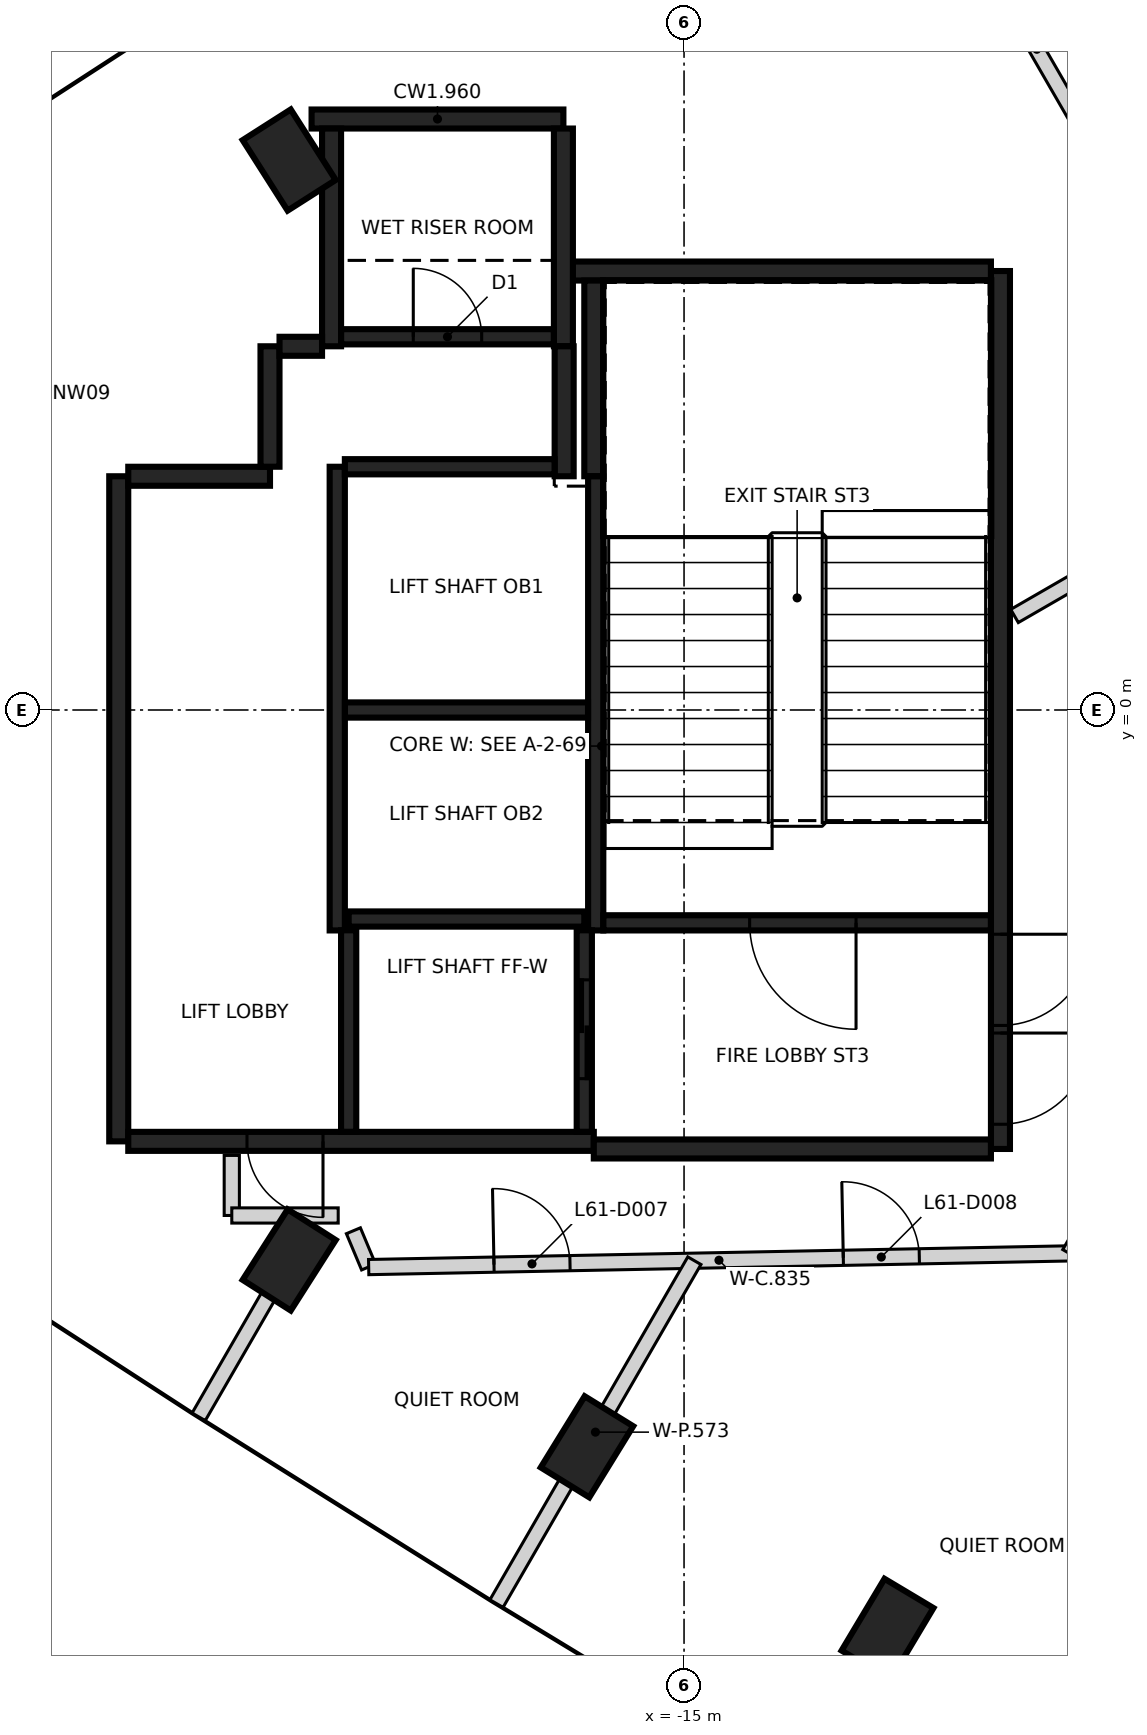
"""IFC4 building model, lengths in metres.
Left out: names, types, materials, properties, quantities, classifications, styles, units other than length and angle.
Written with IfcOpenShell. Run it as: python <this file> out.ifc"""

import sys

from ifc_helpers import new_model, si_unit, direction, frame, frame_2d, origin, origin_2d, place, context, subcontext, project, spatial, rectangle, extrude, element, fill, save


model = new_model("IFC4")
c1 = context("Model", 3, precision=1e-05, world=origin(), true_north=direction((0.0, 1.0)))
c2 = subcontext(c1, "Body", "Model", "MODEL_VIEW")
j1 = project(units=[si_unit("LENGTHUNIT", "METRE"), si_unit("PLANEANGLEUNIT", "RADIAN")], contexts=[c1])
p1 = place(None, origin())
s1 = spatial("IfcSite", under=j1, at=p1, CompositionType="ELEMENT")
p2 = place(p1, origin())
s2 = spatial("IfcBuilding", under=s1, at=p2, CompositionType="ELEMENT")
p3 = place(p2, frame((0.0, 0.0, 243.0)))
s3 = spatial("IfcBuildingStorey", under=s2, at=p3, CompositionType="ELEMENT", Elevation=243.0)
for number, where, z_axis, x_axis in (
    (1, (-20.195, 7.235, -0.35), (0.0, 0.0, 1.0), (-0.538, 0.843, 0.0)),
    (2, (-20.195, -7.235, -0.35), (0.0, 0.0, 1.0), (0.538, 0.843, 0.0)),
    (3, (-16.277, -9.693, -0.35), (0.0, 0.0, 1.0), (0.525, 0.851, 0.0)),
    (4, (-12.323, -12.094, -0.35), (0.0, 0.0, 1.0), (0.513, 0.858, 0.0)),
):
    element("IfcColumn", number, at=place(p3, frame(where, z_axis=z_axis, x_axis=x_axis)), inside=s3, PredefinedType="COLUMN", context=c2, shape_type="SweptSolid", body=[
        extrude(rectangle(XDim=1.1, YDim=0.75, at=origin_2d()), origin(), (0.0, 0.0, 1.0), 3.6),
    ])
p4 = place(p3, frame((-10.837, 5.775, 0.0), z_axis=(0.0, 0.0, 1.0), x_axis=(0.0, -1.0, 0.0)))
e5 = element("IfcWall", 5, at=p4, inside=s3, PredefinedType="SHEAR", context=c2, shape_type="SweptSolid", body=[
    extrude(rectangle(XDim=11.55, YDim=0.25, at=frame_2d((5.775, 0.0))), origin(), (0.0, 0.0, 1.0), 3.25),
])
p5 = place(p4, frame((10.025, 0.0, 0.0)))
e6 = element("IfcOpeningElement", 6, at=p5, cuts=e5, PredefinedType="OPENING", context=c2, shape_type="SweptSolid", body=[
    extrude(rectangle(XDim=1.2, YDim=2.1, at=frame_2d((0.6, 1.05))), frame((0.0, 0.135, 0.0), z_axis=(0.0, -1.0, 0.0), x_axis=(1.0, 0.0, 0.0)), (0.0, 0.0, 1.0), 0.27),
])
p6 = place(p4, frame((8.725, 0.0, 0.0)))
e7 = element("IfcOpeningElement", 7, at=p6, cuts=e5, PredefinedType="OPENING", context=c2, shape_type="SweptSolid", body=[
    extrude(rectangle(XDim=1.2, YDim=2.1, at=frame_2d((0.6, 1.05))), frame((0.0, 0.135, 0.0), z_axis=(0.0, -1.0, 0.0), x_axis=(1.0, 0.0, 0.0)), (0.0, 0.0, 1.0), 0.27),
])
p7 = place(p3, frame((-22.437, -5.675, 0.0), z_axis=(0.0, 0.0, 1.0), x_axis=(0.0, 1.0, 0.0)))
e8 = element("IfcWall", 8, at=p7, inside=s3, PredefinedType="SHEAR", context=c2, shape_type="SweptSolid", body=[
    extrude(rectangle(XDim=8.75, YDim=0.25, at=frame_2d((4.375, 0.0))), origin(), (0.0, 0.0, 1.0), 3.25),
])
p8 = place(p3, frame((-16.187, -5.675, 0.0), z_axis=(0.0, 0.0, 1.0), x_axis=(-1.0, 0.0, 0.0)))
e9 = element("IfcWall", 9, at=p8, inside=s3, PredefinedType="SHEAR", context=c2, shape_type="SweptSolid", body=[
    extrude(rectangle(XDim=6.125, YDim=0.25, at=frame_2d((3.062, 0.0))), origin(), (0.0, 0.0, 1.0), 3.25),
])
p9 = place(p8, frame((3.563, 0.0, 0.0)))
e10 = element("IfcOpeningElement", 10, at=p9, cuts=e9, PredefinedType="OPENING", context=c2, shape_type="SweptSolid", body=[
    extrude(rectangle(XDim=1.0, YDim=2.1, at=frame_2d((0.5, 1.05))), frame((0.0, 0.135, 0.0), z_axis=(0.0, -1.0, 0.0), x_axis=(1.0, 0.0, 0.0)), (0.0, 0.0, 1.0), 0.27),
])
p10 = place(p3, frame((-10.963, -5.775, 0.0), z_axis=(0.0, 0.0, 1.0), x_axis=(-1.0, 0.0, 0.0)))
e11 = element("IfcWall", 11, at=p10, inside=s3, PredefinedType="SHEAR", context=c2, shape_type="SweptSolid", body=[
    extrude(rectangle(XDim=5.225, YDim=0.25, at=frame_2d((2.612, 0.0))), origin(), (0.0, 0.0, 1.0), 3.25),
])
p11 = place(p3, frame((-16.472, 5.775, 0.0), z_axis=(0.0, 0.0, 1.0), x_axis=(1.0, 0.0, 0.0)))
e12 = element("IfcWall", 12, at=p11, inside=s3, PredefinedType="SHEAR", context=c2, shape_type="SweptSolid", body=[
    extrude(rectangle(XDim=5.51, YDim=0.25, at=frame_2d((2.755, 0.0))), origin(), (0.0, 0.0, 1.0), 3.25),
])
p12 = place(p3, frame((-19.9, 7.775, 0.0), z_axis=(0.0, 0.0, 1.0), x_axis=(1.0, 0.0, 0.0)))
e13 = element("IfcWall", 13, at=p12, inside=s3, PredefinedType="SHEAR", context=c2, shape_type="SweptSolid", body=[
    extrude(rectangle(XDim=3.313, YDim=0.25, at=frame_2d((1.656, 0.0))), origin(), (0.0, 0.0, 1.0), 3.25),
])
for number, where, z_axis, x_axis in (
    (14, (-16.587, 7.65, 0.0), (0.0, 0.0, 1.0), (0.0, -1.0, 0.0)),
    (15, (-19.637, 4.785, 0.0), (0.0, 0.0, 1.0), (0.0, 1.0, 0.0)),
):
    element("IfcWall", number, at=place(p3, frame(where, z_axis=z_axis, x_axis=x_axis)), inside=s3, PredefinedType="SHEAR", context=c2, shape_type="SweptSolid", body=[
        extrude(rectangle(XDim=2.865, YDim=0.25, at=frame_2d((1.432, 0.0))), origin(), (0.0, 0.0, 1.0), 3.25),
    ])
p13 = place(p3, frame((-16.187, 3.075, 0.0), z_axis=(0.0, 0.0, 1.0), x_axis=(0.0, 1.0, 0.0)))
e16 = element("IfcWall", 16, at=p13, inside=s3, PredefinedType="SHEAR", context=c2, shape_type="SweptSolid", body=[
    extrude(rectangle(XDim=2.575, YDim=0.25, at=frame_2d((1.287, 0.0))), origin(), (0.0, 0.0, 1.0), 3.25),
])
p14 = place(p3, frame((-22.312, 3.075, 0.0), z_axis=(0.0, 0.0, 1.0), x_axis=(1.0, 0.0, 0.0)))
e17 = element("IfcWall", 17, at=p14, inside=s3, PredefinedType="SHEAR", context=c2, shape_type="SweptSolid", body=[
    extrude(rectangle(XDim=1.865, YDim=0.25, at=frame_2d((0.932, 0.0))), origin(), (0.0, 0.0, 1.0), 3.25),
])
p15 = place(p3, frame((-16.577, 4.785, 0.0), z_axis=(0.0, 0.0, 1.0), x_axis=(0.0, -1.0, 0.0)))
e18 = element("IfcWall", 18, at=p15, inside=s3, PredefinedType="SHEAR", context=c2, shape_type="SweptSolid", body=[
    extrude(rectangle(XDim=1.71, YDim=0.25, at=frame_2d((0.855, 0.0))), origin(), (0.0, 0.0, 1.0), 3.25),
])
p16 = place(p3, frame((-20.447, 3.2, 0.0), z_axis=(0.0, 0.0, 1.0), x_axis=(0.0, 1.0, 0.0)))
e19 = element("IfcWall", 19, at=p16, inside=s3, PredefinedType="SHEAR", context=c2, shape_type="SweptSolid", body=[
    extrude(rectangle(XDim=1.584, YDim=0.25, at=frame_2d((0.792, 0.0))), origin(), (0.0, 0.0, 1.0), 3.25),
])
p17 = place(p3, frame((-20.322, 4.785, 0.0), z_axis=(0.0, 0.0, 1.0), x_axis=(1.0, 0.0, 0.0)))
e20 = element("IfcWall", 20, at=p17, inside=s3, PredefinedType="SHEAR", context=c2, shape_type="SweptSolid", body=[
    extrude(rectangle(XDim=0.559, YDim=0.25, at=frame_2d((0.28, 0.0))), origin(), (0.0, 0.0, 1.0), 3.25),
])
p18 = place(p3, frame((-16.162, 3.074, 0.0), z_axis=(0.0, 0.0, 1.0), x_axis=(0.0, -1.0, 0.0)))
e21 = element("IfcWall", 21, at=p18, inside=s3, PredefinedType="SHEAR", context=c2, shape_type="SweptSolid", body=[
    extrude(rectangle(XDim=5.974, YDim=0.2, at=frame_2d((2.987, 0.0))), origin(), (0.0, 0.0, 1.0), 3.25),
])
p19 = place(p3, frame((-19.562, -2.9, 0.0), z_axis=(0.0, 0.0, 1.0), x_axis=(0.0, 1.0, 0.0)))
e22 = element("IfcWall", 22, at=p19, inside=s3, PredefinedType="SHEAR", context=c2, shape_type="SweptSolid", body=[
    extrude(rectangle(XDim=6.1, YDim=0.2, at=frame_2d((3.05, 0.0))), origin(), (0.0, 0.0, 1.0), 3.25),
])
p20 = place(p3, frame((-10.963, -2.8, 0.0), z_axis=(0.0, 0.0, 1.0), x_axis=(-1.0, 0.0, 0.0)))
e23 = element("IfcWall", 23, at=p20, inside=s3, PredefinedType="SHEAR", context=c2, shape_type="SweptSolid", body=[
    extrude(rectangle(XDim=5.098, YDim=0.2, at=frame_2d((2.549, 0.0))), origin(), (0.0, 0.0, 1.0), 3.25),
])
p21 = place(p20, frame((1.774, 0.0, 0.0)))
e24 = element("IfcOpeningElement", 24, at=p21, cuts=e23, PredefinedType="OPENING", context=c2, shape_type="SweptSolid", body=[
    extrude(rectangle(XDim=1.4, YDim=2.1, at=frame_2d((0.7, 1.05))), frame((0.0, 0.11, 0.0), z_axis=(0.0, -1.0, 0.0), x_axis=(1.0, 0.0, 0.0)), (0.0, 0.0, 1.0), 0.22),
])
p22 = place(p3, frame((-16.263, 0.0, 0.0), z_axis=(0.0, 0.0, 1.0), x_axis=(-1.0, 0.0, 0.0)))
e25 = element("IfcWall", 25, at=p22, inside=s3, PredefinedType="SHEAR", context=c2, shape_type="SweptSolid", body=[
    extrude(rectangle(XDim=3.198, YDim=0.2, at=frame_2d((1.599, 0.0))), origin(), (0.0, 0.0, 1.0), 3.25),
])
p23 = place(p3, frame((-19.511, 4.91, 0.0), z_axis=(0.0, 0.0, 1.0), x_axis=(1.0, 0.0, 0.0)))
e26 = element("IfcWall", 26, at=p23, inside=s3, PredefinedType="SHEAR", context=c2, shape_type="SweptSolid", body=[
    extrude(rectangle(XDim=2.798, YDim=0.2, at=frame_2d((1.399, 0.0))), origin(), (0.0, 0.0, 1.0), 3.25),
])
p24 = place(p23, frame((0.949, 0.0, 0.0)))
e27 = element("IfcOpeningElement", 27, at=p24, cuts=e26, PredefinedType="OPENING", context=c2, shape_type="SweptSolid", body=[
    extrude(rectangle(XDim=0.9, YDim=2.1, at=frame_2d((0.45, 1.05))), frame((0.0, 0.11, 0.0), z_axis=(0.0, -1.0, 0.0), x_axis=(1.0, 0.0, 0.0)), (0.0, 0.0, 1.0), 0.22),
])
p25 = place(p3, frame((-19.462, 3.2, 0.0), z_axis=(0.0, 0.0, 1.0), x_axis=(1.0, 0.0, 0.0)))
e28 = element("IfcWall", 28, at=p25, inside=s3, PredefinedType="SHEAR", context=c2, shape_type="SweptSolid", body=[
    extrude(rectangle(XDim=2.759, YDim=0.2, at=frame_2d((1.379, 0.0))), origin(), (0.0, 0.0, 1.0), 3.25),
])
p26 = place(p3, frame((-19.412, -2.75, 0.0), z_axis=(0.0, 0.0, 1.0), x_axis=(1.0, 0.0, 0.0)))
e29 = element("IfcWall", 29, at=p26, inside=s3, PredefinedType="SHEAR", context=c2, shape_type="SweptSolid", body=[
    extrude(rectangle(XDim=3.1, YDim=0.2, at=frame_2d((1.55, 0.0))), origin(), (0.0, 0.0, 1.0), 3.25),
])
p27 = place(p3, frame((-16.312, -2.898, 0.0), z_axis=(0.0, 0.0, 1.0), x_axis=(0.0, -1.0, 0.0)))
e30 = element("IfcWall", 30, at=p27, inside=s3, PredefinedType="SHEAR", context=c2, shape_type="SweptSolid", body=[
    extrude(rectangle(XDim=2.651, YDim=0.2, at=frame_2d((1.325, 0.0))), origin(), (0.0, 0.0, 1.0), 3.25),
])
p28 = place(p27, frame((0.652, 0.0, 0.0)))
e31 = element("IfcOpeningElement", 31, at=p28, cuts=e30, PredefinedType="OPENING", context=c2, shape_type="SweptSolid", body=[
    extrude(rectangle(XDim=1.3, YDim=2.1, at=frame_2d((0.65, 1.05))), frame((0.0, 0.11, 0.0), z_axis=(0.0, -1.0, 0.0), x_axis=(1.0, 0.0, 0.0)), (0.0, 0.0, 1.0), 0.22),
])
p29 = place(p3, frame((-19.412, -5.549, 0.0), z_axis=(0.0, 0.0, 1.0), x_axis=(0.0, 1.0, 0.0)))
e32 = element("IfcWall", 32, at=p29, inside=s3, PredefinedType="SHEAR", context=c2, shape_type="SweptSolid", body=[
    extrude(rectangle(XDim=2.651, YDim=0.2, at=frame_2d((1.325, 0.0))), origin(), (0.0, 0.0, 1.0), 3.25),
])
p30 = place(p3, frame((-20.95, -6.65, 0.0), z_axis=(0.0, 0.0, 1.0), x_axis=(0.0, 1.0, 0.0)))
e33 = element("IfcWall", 33, at=p30, inside=s3, PredefinedType="PARTITIONING", context=c2, shape_type="SweptSolid", body=[
    extrude(rectangle(XDim=0.79, YDim=0.2, at=frame_2d((0.395, 0.0))), origin(), (0.0, 0.0, 1.0), 2.35),
])
p31 = place(p3, frame((-20.95, -6.65, 0.0), z_axis=(0.0, 0.0, 1.0), x_axis=(1.0, 0.0, 0.0)))
e34 = element("IfcWall", 34, at=p31, inside=s3, PredefinedType="PARTITIONING", context=c2, shape_type="SweptSolid", body=[
    extrude(rectangle(XDim=1.4, YDim=0.2, at=frame_2d((0.7, 0.0))), origin(), (0.0, 0.0, 1.0), 2.35),
])
p32 = place(p3, frame((-19.15, -7.328, 0.0), z_axis=(0.0, 0.0, 1.0), x_axis=(-0.38712813986, 0.92202592335, 0.0)))
e35 = element("IfcWall", 35, at=p32, inside=s3, PredefinedType="PARTITIONING", context=c2, shape_type="SweptSolid", body=[
    extrude(rectangle(XDim=0.517, YDim=0.2, at=frame_2d((0.259, 0.0))), origin(), (0.0, 0.0, 1.0), 3.25),
])
p33 = place(p3, frame((-19.149, -7.329, 0.0), z_axis=(0.0, 0.0, 1.0), x_axis=(0.999808990333, 0.019544381503, 0.0)))
e36 = element("IfcWall", 36, at=p33, inside=s3, PredefinedType="PARTITIONING", context=c2, shape_type="SweptSolid", body=[
    extrude(rectangle(XDim=9.219, YDim=0.2, at=frame_2d((4.609, 0.0))), origin(), (0.0, 0.0, 1.0), 3.25),
])
p34 = place(p33, frame((1.649, 0.0, 0.0)))
e37 = element("IfcOpeningElement", 37, at=p34, cuts=e36, PredefinedType="OPENING", context=c2, shape_type="SweptSolid", body=[
    extrude(rectangle(XDim=1.0, YDim=2.1, at=frame_2d((0.5, 1.05))), frame((0.0, 0.11, 0.0), z_axis=(0.0, -1.0, 0.0), x_axis=(1.0, 0.0, 0.0)), (0.0, 0.0, 1.0), 0.22),
])
p35 = place(p33, frame((6.245, 0.0, 0.0)))
e38 = element("IfcOpeningElement", 38, at=p35, cuts=e36, PredefinedType="OPENING", context=c2, shape_type="SweptSolid", body=[
    extrude(rectangle(XDim=1.0, YDim=2.1, at=frame_2d((0.5, 1.05))), frame((0.0, 0.11, 0.0), z_axis=(0.0, -1.0, 0.0), x_axis=(1.0, 0.0, 0.0)), (0.0, 0.0, 1.0), 0.22),
])
p36 = place(p3, frame((-10.652, 1.237, 0.0), z_axis=(0.0, 0.0, 1.0), x_axis=(0.865922902183, 0.50017749597, 0.0)))
e39 = element("IfcWall", 39, at=p36, inside=s3, PredefinedType="PARTITIONING", context=c2, shape_type="SweptSolid", body=[
    extrude(rectangle(XDim=13.328, YDim=0.2, at=frame_2d((6.664, 0.0))), origin(), (0.0, 0.0, 1.0), 3.25),
])
p37 = place(p36, frame((4.171, 0.0, 0.0)))
e40 = element("IfcOpeningElement", 40, at=p37, cuts=e39, PredefinedType="OPENING", context=c2, shape_type="SweptSolid", body=[
    extrude(rectangle(XDim=0.95, YDim=2.1, at=frame_2d((0.475, 1.05))), frame((0.0, 0.11, 0.0), z_axis=(0.0, -1.0, 0.0), x_axis=(1.0, 0.0, 0.0)), (0.0, 0.0, 1.0), 0.22),
])
p38 = place(p36, frame((1.463, 0.0, 0.0)))
e41 = element("IfcOpeningElement", 41, at=p38, cuts=e39, PredefinedType="OPENING", context=c2, shape_type="SweptSolid", body=[
    extrude(rectangle(XDim=1.0, YDim=2.1, at=frame_2d((0.5, 1.05))), frame((0.0, 0.11, 0.0), z_axis=(0.0, -1.0, 0.0), x_axis=(1.0, 0.0, 0.0)), (0.0, 0.0, 1.0), 0.22),
])
p39 = place(p3, frame((-9.931, -7.149, 0.0), z_axis=(0.0, 0.0, 1.0), x_axis=(0.499829760107, 0.866123669525, 0.0)))
e42 = element("IfcWall", 42, at=p39, inside=s3, PredefinedType="PARTITIONING", context=c2, shape_type="SweptSolid", body=[
    extrude(rectangle(XDim=2.889, YDim=0.2, at=frame_2d((1.444, 0.0))), origin(), (0.0, 0.0, 1.0), 3.25),
])
p40 = place(p3, frame((-21.385, -9.299, 0.0), z_axis=(0.0, 0.0, 1.0), x_axis=(0.499818570291, 0.86613012694, 0.0)))
e43 = element("IfcWall", 43, at=p40, inside=s3, PredefinedType="PARTITIONING", context=c2, shape_type="SweptSolid", body=[
    extrude(rectangle(XDim=2.712, YDim=0.2, at=frame_2d((1.356, 0.0))), origin(), (0.0, 0.0, 1.0), 3.25),
])
p41 = place(p3, frame((-17.468, -11.756, 0.0), z_axis=(0.0, 0.0, 1.0), x_axis=(0.499890179513, 0.866088799389, 0.0)))
e44 = element("IfcWall", 44, at=p41, inside=s3, PredefinedType="PARTITIONING", context=c2, shape_type="SweptSolid", body=[
    extrude(rectangle(XDim=5.208, YDim=0.2, at=frame_2d((2.604, 0.0))), origin(), (0.0, 0.0, 1.0), 3.25),
])
p42 = place(p3, frame((-13.513, 14.156, 0.0), z_axis=(0.0, 0.0, 1.0), x_axis=(0.500012240511, -0.866018336607, 0.0)))
e45 = element("IfcWall", 45, at=p42, inside=s3, PredefinedType="PARTITIONING", context=c2, shape_type="SweptSolid", body=[
    extrude(rectangle(XDim=12.616, YDim=0.2, at=frame_2d((6.308, 0.0))), origin(), (0.0, 0.0, 1.0), 3.25),
])
p43 = place(p28, origin())
e46 = element("IfcDoor", 46, at=p43, inside=s3, OperationType="SLIDING_TO_RIGHT", PredefinedType="DOOR", context=c2, shape_type="SweptSolid", body=[
    extrude(rectangle(XDim=1.3, YDim=2.1, at=frame_2d((0.65, 1.05))), frame((0.0, 0.025, 0.0), z_axis=(0.0, -1.0, 0.0), x_axis=(1.0, 0.0, 0.0)), (0.0, 0.0, 1.0), 0.05),
])
fill(e31, e46)
p44 = place(p9, origin())
e47 = element("IfcDoor", 47, at=p44, inside=s3, OperationType="SINGLE_SWING_LEFT", PredefinedType="DOOR", context=c2, shape_type="SweptSolid", body=[
    extrude(rectangle(XDim=1.0, YDim=2.1, at=frame_2d((0.5, 1.05))), frame((0.0, 0.025, 0.0), z_axis=(0.0, -1.0, 0.0), x_axis=(1.0, 0.0, 0.0)), (0.0, 0.0, 1.0), 0.05),
])
fill(e10, e47)
p45 = place(p5, origin())
e48 = element("IfcDoor", 48, at=p45, inside=s3, OperationType="SINGLE_SWING_LEFT", PredefinedType="DOOR", context=c2, shape_type="SweptSolid", body=[
    extrude(rectangle(XDim=1.2, YDim=2.1, at=frame_2d((0.6, 1.05))), frame((0.0, 0.025, 0.0), z_axis=(0.0, -1.0, 0.0), x_axis=(1.0, 0.0, 0.0)), (0.0, 0.0, 1.0), 0.05),
])
fill(e6, e48)
p46 = place(p6, origin())
e49 = element("IfcDoor", 49, at=p46, inside=s3, OperationType="SINGLE_SWING_RIGHT", PredefinedType="DOOR", context=c2, shape_type="SweptSolid", body=[
    extrude(rectangle(XDim=1.2, YDim=2.1, at=frame_2d((0.6, 1.05))), frame((0.0, 0.025, 0.0), z_axis=(0.0, -1.0, 0.0), x_axis=(1.0, 0.0, 0.0)), (0.0, 0.0, 1.0), 0.05),
])
fill(e7, e49)
p47 = place(p21, origin())
e50 = element("IfcDoor", 50, at=p47, inside=s3, OperationType="SINGLE_SWING_RIGHT", PredefinedType="DOOR", context=c2, shape_type="SweptSolid", body=[
    extrude(rectangle(XDim=1.4, YDim=2.1, at=frame_2d((0.7, 1.05))), frame((0.0, 0.025, 0.0), z_axis=(0.0, -1.0, 0.0), x_axis=(1.0, 0.0, 0.0)), (0.0, 0.0, 1.0), 0.05),
])
fill(e24, e50)
p48 = place(p24, origin())
e51 = element("IfcDoor", 51, at=p48, inside=s3, OperationType="SINGLE_SWING_LEFT", PredefinedType="DOOR", context=c2, shape_type="SweptSolid", body=[
    extrude(rectangle(XDim=0.9, YDim=2.1, at=frame_2d((0.45, 1.05))), frame((0.0, 0.025, 0.0), z_axis=(0.0, -1.0, 0.0), x_axis=(1.0, 0.0, 0.0)), (0.0, 0.0, 1.0), 0.05),
])
fill(e27, e51)
p49 = place(p34, frame((1.0, 0.0, 0.0), z_axis=(0.0, 0.0, 1.0), x_axis=(-1.0, 0.0, 0.0)))
e52 = element("IfcDoor", 52, at=p49, inside=s3, OperationType="SINGLE_SWING_LEFT", PredefinedType="DOOR", context=c2, shape_type="SweptSolid", body=[
    extrude(rectangle(XDim=1.0, YDim=2.1, at=frame_2d((0.5, 1.05))), frame((0.0, 0.025, 0.0), z_axis=(0.0, -1.0, 0.0), x_axis=(1.0, 0.0, 0.0)), (0.0, 0.0, 1.0), 0.05),
])
fill(e37, e52)
p50 = place(p35, frame((1.0, 0.0, 0.0), z_axis=(0.0, 0.0, 1.0), x_axis=(-1.0, 0.0, 0.0)))
e53 = element("IfcDoor", 53, at=p50, inside=s3, OperationType="SINGLE_SWING_LEFT", PredefinedType="DOOR", context=c2, shape_type="SweptSolid", body=[
    extrude(rectangle(XDim=1.0, YDim=2.1, at=frame_2d((0.5, 1.05))), frame((0.0, 0.025, 0.0), z_axis=(0.0, -1.0, 0.0), x_axis=(1.0, 0.0, 0.0)), (0.0, 0.0, 1.0), 0.05),
])
fill(e38, e53)
save(model, sys.argv[1])
